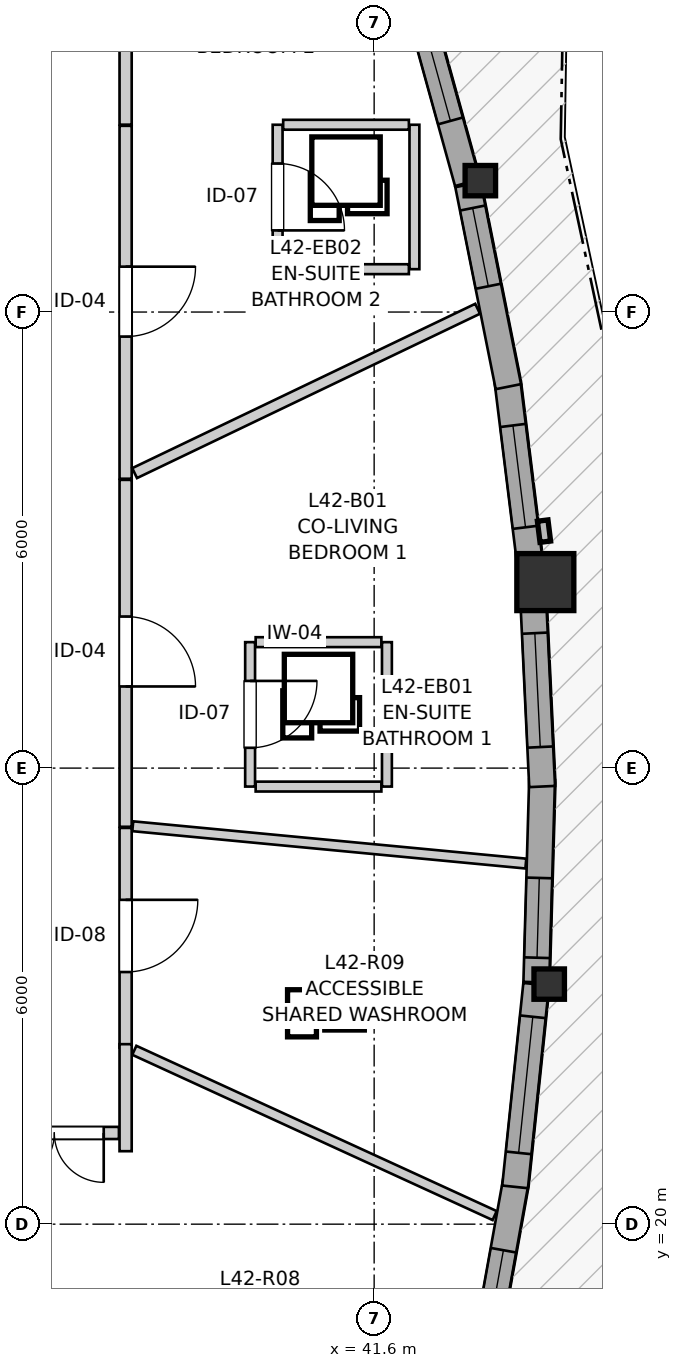
"""IFC4 building model, lengths in metres.
Left out: names, types, materials, properties, quantities, classifications, styles, units other than length and angle.
Written with IfcOpenShell. Run it as: python <this file> out.ifc"""

import sys

from ifc_helpers import new_model, si_unit, direction, frame, frame_2d, origin, origin_2d, place, context, subcontext, project, spatial, rectangle, i_section, extrude, source, transform, mapped, element, fill, save


model = new_model("IFC4")
c1 = context("Model", 3, precision=1e-05, world=origin(), true_north=direction((0.0, 1.0)))
c2 = subcontext(c1, "Body", "Model", "MODEL_VIEW")
j1 = project(units=[si_unit("LENGTHUNIT", "METRE"), si_unit("PLANEANGLEUNIT", "RADIAN")], contexts=[c1])
p1 = place(None, origin())
s1 = spatial("IfcSite", under=j1, at=p1, CompositionType="ELEMENT")
p2 = place(p1, origin())
s2 = spatial("IfcBuilding", under=s1, at=p2, CompositionType="ELEMENT")
p3 = place(p2, frame((0.0, 0.0, 142.6)))
s3 = spatial("IfcBuildingStorey", under=s2, at=p3, CompositionType="ELEMENT", Elevation=142.6)
m1 = source(origin(), c2, "Body", "SweptSolid", [
    extrude(i_section(OverallWidth=0.401, OverallDepth=0.399, WebThickness=0.023, FlangeThickness=0.036, FilletRadius=0.015, at=origin_2d()), origin(), (0.0, 0.0, 1.0), 2.95),
])
p4 = place(p3, frame((43.903, 23.158, 0.0), z_axis=(0.0, 0.0, 1.0), x_axis=(1.0, 0.0, 0.0)))
e1 = element("IfcColumn", 1, at=p4, inside=s3, PredefinedType="PILASTER", context=c2, shape_type="MappedRepresentation", body=[
    mapped(m1, transform((0.0, 0.0, 0.0), x_axis=(1.0, 0.0, 0.0), y_axis=(0.0, 1.0, 0.0), z_axis=(0.0, 0.0, 1.0), scale=1.0)),
])
m2 = source(origin(), c2, "Body", "SweptSolid", [
    extrude(rectangle(XDim=0.75, YDim=0.75, at=origin_2d()), origin(), (0.0, 0.0, 1.0), 2.95),
])
p5 = place(p3, frame((43.852, 28.447, 0.0), z_axis=(0.0, 0.0, 1.0), x_axis=(1.0, 0.0, 0.0)))
e2 = element("IfcColumn", 2, at=p5, inside=s3, PredefinedType="COLUMN", context=c2, shape_type="MappedRepresentation", body=[
    mapped(m2, transform((0.0, 0.0, 0.0), x_axis=(1.0, 0.0, 0.0), y_axis=(0.0, 1.0, 0.0), z_axis=(0.0, 0.0, 1.0), scale=1.0)),
])
p6 = place(p3, frame((42.997, 33.729, 0.0), z_axis=(0.0, 0.0, 1.0), x_axis=(1.0, 0.0, 0.0)))
e3 = element("IfcColumn", 3, at=p6, inside=s3, PredefinedType="PILASTER", context=c2, shape_type="MappedRepresentation", body=[
    mapped(m1, transform((0.0, 0.0, 0.0), x_axis=(1.0, 0.0, 0.0), y_axis=(0.0, 1.0, 0.0), z_axis=(0.0, 0.0, 1.0), scale=1.0)),
])
p7 = place(p3, frame((43.01, 18.044, 0.0), z_axis=(0.0, 0.0, 1.0), x_axis=(0.177116262048, 0.984189935794, 0.0)))
e4 = element("IfcWall", 4, at=p7, inside=s3, PredefinedType="SOLIDWALL", context=c2, shape_type="SweptSolid", body=[
    extrude(rectangle(XDim=2.575, YDim=0.34, at=frame_2d((1.288, 0.0))), origin(), (0.0, 0.0, 1.0), 2.53),
])
p8 = place(p7, frame((0.489, 0.0, 0.82)))
e5 = element("IfcOpeningElement", 5, at=p8, cuts=e4, PredefinedType="OPENING", context=c2, shape_type="SweptSolid", body=[
    extrude(rectangle(XDim=1.15, YDim=1.2, at=frame_2d((0.575, 0.6))), frame((0.0, 0.18, 0.0), z_axis=(0.0, -1.0, 0.0), x_axis=(1.0, 0.0, 0.0)), (0.0, 0.0, 1.0), 0.36),
])
p9 = place(p3, frame((43.454, 20.49, 0.0), z_axis=(0.0, 0.0, 1.0), x_axis=(0.103669919384, 0.994611757328, 0.0)))
e6 = element("IfcWall", 6, at=p9, inside=s3, PredefinedType="SOLIDWALL", context=c2, shape_type="SweptSolid", body=[
    extrude(rectangle(XDim=2.68, YDim=0.34, at=frame_2d((1.34, 0.0))), origin(), (0.0, 0.0, 1.0), 2.53),
])
p10 = place(p9, frame((0.45, 0.0, 0.82)))
e7 = element("IfcOpeningElement", 7, at=p10, cuts=e6, PredefinedType="OPENING", context=c2, shape_type="SweptSolid", body=[
    extrude(rectangle(XDim=1.8, YDim=1.45, at=frame_2d((0.9, 0.725))), frame((0.0, 0.18, 0.0), z_axis=(0.0, -1.0, 0.0), x_axis=(1.0, 0.0, 0.0)), (0.0, 0.0, 1.0), 0.36),
])
p11 = place(p3, frame((43.734, 23.183, 0.0), z_axis=(0.0, 0.0, 1.0), x_axis=(0.028311286797, 0.999599155182, 0.0)))
e8 = element("IfcWall", 8, at=p11, inside=s3, PredefinedType="SOLIDWALL", context=c2, shape_type="SweptSolid", body=[
    extrude(rectangle(XDim=2.665, YDim=0.34, at=frame_2d((1.332, 0.0))), origin(), (0.0, 0.0, 1.0), 2.53),
])
p12 = place(p11, frame((0.323, 0.0, 0.82)))
e9 = element("IfcOpeningElement", 9, at=p12, cuts=e8, PredefinedType="OPENING", context=c2, shape_type="SweptSolid", body=[
    extrude(rectangle(XDim=1.05, YDim=1.45, at=frame_2d((0.525, 0.725))), frame((0.0, 0.18, 0.0), z_axis=(0.0, -1.0, 0.0), x_axis=(1.0, 0.0, 0.0)), (0.0, 0.0, 1.0), 0.36),
])
p13 = place(p3, frame((43.81, 25.758, 0.0), z_axis=(0.0, 0.0, 1.0), x_axis=(-0.047679791281, 0.998862671994, 0.0)))
e10 = element("IfcWall", 10, at=p13, inside=s3, PredefinedType="SOLIDWALL", context=c2, shape_type="SweptSolid", body=[
    extrude(rectangle(XDim=2.53, YDim=0.34, at=frame_2d((1.265, 0.0))), origin(), (0.0, 0.0, 1.0), 2.53),
])
p14 = place(p13, frame((0.52, 0.0, 0.82)))
e11 = element("IfcOpeningElement", 11, at=p14, cuts=e10, PredefinedType="OPENING", context=c2, shape_type="SweptSolid", body=[
    extrude(rectangle(XDim=1.5, YDim=1.45, at=frame_2d((0.75, 0.725))), frame((0.0, 0.18, 0.0), z_axis=(0.0, -1.0, 0.0), x_axis=(1.0, 0.0, 0.0)), (0.0, 0.0, 1.0), 0.36),
])
p15 = place(p3, frame((43.664, 28.58, 0.0), z_axis=(0.0, 0.0, 1.0), x_axis=(-0.122794881762, 0.992432071737, 0.0)))
e12 = element("IfcWall", 12, at=p15, inside=s3, PredefinedType="SOLIDWALL", context=c2, shape_type="SweptSolid", body=[
    extrude(rectangle(XDim=2.545, YDim=0.34, at=frame_2d((1.272, 0.0))), origin(), (0.0, 0.0, 1.0), 2.53),
])
p16 = place(p15, frame((0.592, 0.0, 0.82)))
e13 = element("IfcOpeningElement", 13, at=p16, cuts=e12, PredefinedType="OPENING", context=c2, shape_type="SweptSolid", body=[
    extrude(rectangle(XDim=1.35, YDim=1.45, at=frame_2d((0.675, 0.725))), frame((0.0, 0.18, 0.0), z_axis=(0.0, -1.0, 0.0), x_axis=(1.0, 0.0, 0.0)), (0.0, 0.0, 1.0), 0.36),
])
p17 = place(p3, frame((43.366, 31.018, 0.0), z_axis=(0.0, 0.0, 1.0), x_axis=(-0.196116135138, 0.980580675691, 0.0)))
e14 = element("IfcWall", 14, at=p17, inside=s3, PredefinedType="SOLIDWALL", context=c2, shape_type="SweptSolid", body=[
    extrude(rectangle(XDim=2.71, YDim=0.34, at=frame_2d((1.355, 0.0))), origin(), (0.0, 0.0, 1.0), 2.53),
])
p18 = place(p17, frame((1.347, 0.0, 0.82)))
e15 = element("IfcOpeningElement", 15, at=p18, cuts=e14, PredefinedType="OPENING", context=c2, shape_type="SweptSolid", body=[
    extrude(rectangle(XDim=1.05, YDim=1.45, at=frame_2d((0.525, 0.725))), frame((0.0, 0.18, 0.0), z_axis=(0.0, -1.0, 0.0), x_axis=(1.0, 0.0, 0.0)), (0.0, 0.0, 1.0), 0.36),
])
p19 = place(p3, frame((42.828, 33.703, 0.0), z_axis=(0.0, 0.0, 1.0), x_axis=(-0.266340796898, 0.963878923884, 0.0)))
e16 = element("IfcWall", 16, at=p19, inside=s3, PredefinedType="SOLIDWALL", context=c2, shape_type="SweptSolid", body=[
    extrude(rectangle(XDim=2.755, YDim=0.34, at=frame_2d((1.377, 0.0))), origin(), (0.0, 0.0, 1.0), 2.53),
])
p20 = place(p19, frame((0.842, 0.0, 0.82)))
e17 = element("IfcOpeningElement", 17, at=p20, cuts=e16, PredefinedType="OPENING", context=c2, shape_type="SweptSolid", body=[
    extrude(rectangle(XDim=1.05, YDim=1.45, at=frame_2d((0.525, 0.725))), frame((0.0, 0.18, 0.0), z_axis=(0.0, -1.0, 0.0), x_axis=(1.0, 0.0, 0.0)), (0.0, 0.0, 1.0), 0.36),
])
p21 = place(p3, frame((38.33, 34.45, 0.0), z_axis=(0.0, 0.0, 1.0), x_axis=(0.0, -1.0, 0.0)))
e18 = element("IfcWall", 18, at=p21, inside=s3, PredefinedType="PARTITIONING", context=c2, shape_type="SweptSolid", body=[
    extrude(rectangle(XDim=4.643, YDim=0.16, at=frame_2d((2.322, 0.0))), origin(), (0.0, 0.0, 1.0), 2.588),
])
p22 = place(p21, frame((1.853, 0.0, 0.0)))
e19 = element("IfcOpeningElement", 19, at=p22, cuts=e18, PredefinedType="OPENING", context=c2, shape_type="SweptSolid", body=[
    extrude(rectangle(XDim=0.92, YDim=2.1, at=frame_2d((0.46, 1.05))), frame((0.0, 0.09, 0.0), z_axis=(0.0, -1.0, 0.0), x_axis=(1.0, 0.0, 0.0)), (0.0, 0.0, 1.0), 0.18),
])
p23 = place(p3, frame((38.33, 29.792, 0.0), z_axis=(0.0, 0.0, 1.0), x_axis=(0.0, -1.0, 0.0)))
e20 = element("IfcWall", 20, at=p23, inside=s3, PredefinedType="PARTITIONING", context=c2, shape_type="SweptSolid", body=[
    extrude(rectangle(XDim=4.564, YDim=0.16, at=frame_2d((2.282, 0.0))), origin(), (0.0, 0.0, 1.0), 2.95),
])
p24 = place(p23, frame((1.798, 0.0, 0.0)))
e21 = element("IfcOpeningElement", 21, at=p24, cuts=e20, PredefinedType="OPENING", context=c2, shape_type="SweptSolid", body=[
    extrude(rectangle(XDim=0.92, YDim=2.1, at=frame_2d((0.46, 1.05))), frame((0.0, 0.09, 0.0), z_axis=(0.0, -1.0, 0.0), x_axis=(1.0, 0.0, 0.0)), (0.0, 0.0, 1.0), 0.18),
])
p25 = place(p3, frame((38.33, 25.213, 0.0), z_axis=(0.0, 0.0, 1.0), x_axis=(0.0, -1.0, 0.0)))
e22 = element("IfcWall", 22, at=p25, inside=s3, PredefinedType="PARTITIONING", context=c2, shape_type="SweptSolid", body=[
    extrude(rectangle(XDim=2.89, YDim=0.16, at=frame_2d((1.445, 0.0))), origin(), (0.0, 0.0, 1.0), 2.95),
])
p26 = place(p25, frame((0.946, 0.0, 0.0)))
e23 = element("IfcOpeningElement", 23, at=p26, cuts=e22, PredefinedType="OPENING", context=c2, shape_type="SweptSolid", body=[
    extrude(rectangle(XDim=0.95, YDim=2.1, at=frame_2d((0.475, 1.05))), frame((0.0, 0.09, 0.0), z_axis=(0.0, -1.0, 0.0), x_axis=(1.0, 0.0, 0.0)), (0.0, 0.0, 1.0), 0.18),
])
p27 = place(p3, frame((39.968, 27.657, 0.0), z_axis=(0.0, 0.0, 1.0), x_axis=(0.0, -1.0, 0.0)))
e24 = element("IfcWall", 24, at=p27, inside=s3, PredefinedType="PARTITIONING", context=c2, shape_type="SweptSolid", body=[
    extrude(rectangle(XDim=1.9, YDim=0.13, at=frame_2d((0.95, 0.0))), origin(), (0.0, 0.0, 1.0), 2.95),
])
p28 = place(p27, frame((0.51, 0.0, 0.0)))
e25 = element("IfcOpeningElement", 25, at=p28, cuts=e24, PredefinedType="OPENING", context=c2, shape_type="SweptSolid", body=[
    extrude(rectangle(XDim=0.88, YDim=2.05, at=frame_2d((0.44, 1.025))), frame((0.0, 0.075, 0.0), z_axis=(0.0, -1.0, 0.0), x_axis=(1.0, 0.0, 0.0)), (0.0, 0.0, 1.0), 0.15),
])
p29 = place(p3, frame((40.33, 34.464, 0.0), z_axis=(0.0, 0.0, 1.0), x_axis=(0.0, -1.0, 0.0)))
e26 = element("IfcWall", 26, at=p29, inside=s3, PredefinedType="PARTITIONING", context=c2, shape_type="SweptSolid", body=[
    extrude(rectangle(XDim=1.9, YDim=0.13, at=frame_2d((0.95, 0.0))), origin(), (0.0, 0.0, 1.0), 2.558),
])
p30 = place(p29, frame((0.51, 0.0, 0.0)))
e27 = element("IfcOpeningElement", 27, at=p30, cuts=e26, PredefinedType="OPENING", context=c2, shape_type="SweptSolid", body=[
    extrude(rectangle(XDim=0.88, YDim=2.05, at=frame_2d((0.44, 1.025))), frame((0.0, 0.075, 0.0), z_axis=(0.0, -1.0, 0.0), x_axis=(1.0, 0.0, 0.0)), (0.0, 0.0, 1.0), 0.15),
])
p31 = place(p3, frame((38.242, 21.2, 0.0), z_axis=(0.0, 0.0, 1.0), x_axis=(-1.0, 0.0, 0.0)))
e28 = element("IfcWall", 28, at=p31, inside=s3, PredefinedType="PARTITIONING", context=c2, shape_type="SweptSolid", body=[
    extrude(rectangle(XDim=1.684, YDim=0.16, at=frame_2d((0.842, 0.0))), origin(), (0.0, 0.0, 1.0), 2.95),
])
p32 = place(p31, frame((0.2, 0.0, 0.0)))
e29 = element("IfcOpeningElement", 29, at=p32, cuts=e28, PredefinedType="OPENING", context=c2, shape_type="SweptSolid", body=[
    extrude(rectangle(XDim=1.3, YDim=2.1, at=frame_2d((0.65, 1.05))), frame((0.0, 0.09, 0.0), z_axis=(0.0, -1.0, 0.0), x_axis=(1.0, 0.0, 0.0)), (0.0, 0.0, 1.0), 0.18),
])
p33 = place(p3, frame((36.609, 19.221, 0.0), z_axis=(0.0, 0.0, 1.0), x_axis=(0.67832941292, -0.734757924467, 0.0)))
e30 = element("IfcWall", 30, at=p33, inside=s3, PredefinedType="PARTITIONING", context=c2, shape_type="SweptSolid", body=[
    extrude(rectangle(XDim=7.403, YDim=0.145, at=frame_2d((3.701, 0.0))), origin(), (0.0, 0.0, 1.0), 2.95),
])
p34 = place(p3, frame((38.444, 22.288, 0.0), z_axis=(0.0, 0.0, 1.0), x_axis=(0.908945866603, -0.416914153736, 0.0)))
e31 = element("IfcWall", 31, at=p34, inside=s3, PredefinedType="PARTITIONING", context=c2, shape_type="SweptSolid", body=[
    extrude(rectangle(XDim=5.217, YDim=0.13, at=frame_2d((2.608, 0.0))), origin(), (0.0, 0.0, 1.0), 2.95),
])
p35 = place(p3, frame((38.424, 25.235, 0.0), z_axis=(0.0, 0.0, 1.0), x_axis=(0.995523942217, -0.094509684549, 0.0)))
e32 = element("IfcWall", 32, at=p35, inside=s3, PredefinedType="PARTITIONING", context=c2, shape_type="SweptSolid", body=[
    extrude(rectangle(XDim=5.195, YDim=0.13, at=frame_2d((2.597, 0.0))), origin(), (0.0, 0.0, 1.0), 2.95),
])
p36 = place(p3, frame((38.448, 29.881, 0.0), z_axis=(0.0, 0.0, 1.0), x_axis=(0.901842564972, 0.432064796072, 0.0)))
e33 = element("IfcWall", 33, at=p36, inside=s3, PredefinedType="PARTITIONING", context=c2, shape_type="SweptSolid", body=[
    extrude(rectangle(XDim=5.004, YDim=0.145, at=frame_2d((2.502, 0.0))), origin(), (0.0, 0.0, 1.0), 2.95),
])
p37 = place(p3, frame((41.768, 25.757, 0.0), z_axis=(0.0, 0.0, 1.0), x_axis=(0.0, 1.0, 0.0)))
e34 = element("IfcWall", 34, at=p37, inside=s3, PredefinedType="PARTITIONING", context=c2, shape_type="SweptSolid", body=[
    extrude(rectangle(XDim=1.9, YDim=0.13, at=frame_2d((0.95, 0.0))), origin(), (0.0, 0.0, 1.0), 2.95),
])
p38 = place(p3, frame((42.13, 32.564, 0.0), z_axis=(0.0, 0.0, 1.0), x_axis=(0.0, 1.0, 0.0)))
e35 = element("IfcWall", 35, at=p38, inside=s3, PredefinedType="PARTITIONING", context=c2, shape_type="SweptSolid", body=[
    extrude(rectangle(XDim=1.9, YDim=0.13, at=frame_2d((0.95, 0.0))), origin(), (0.0, 0.0, 1.0), 2.95),
])
for number, where, z_axis, x_axis in (
    (36, (40.403, 34.464, 0.0), (0.0, 0.0, 1.0), (1.0, 0.0, 0.0)),
    (37, (40.403, 32.564, 0.0), (0.0, 0.0, 1.0), (1.0, 0.0, 0.0)),
):
    element("IfcWall", number, at=place(p3, frame(where, z_axis=z_axis, x_axis=x_axis)), inside=s3, PredefinedType="PARTITIONING", context=c2, shape_type="SweptSolid", body=[
        extrude(rectangle(XDim=1.654, YDim=0.13, at=frame_2d((0.827, 0.0))), origin(), (0.0, 0.0, 1.0), 2.95),
    ])
p39 = place(p3, frame((40.041, 27.657, 0.0), z_axis=(0.0, 0.0, 1.0), x_axis=(1.0, 0.0, 0.0)))
e38 = element("IfcWall", 38, at=p39, inside=s3, PredefinedType="PARTITIONING", context=c2, shape_type="SweptSolid", body=[
    extrude(rectangle(XDim=1.654, YDim=0.13, at=frame_2d((0.827, 0.0))), origin(), (0.0, 0.0, 1.0), 2.318),
])
p40 = place(p3, frame((40.041, 25.757, 0.0), z_axis=(0.0, 0.0, 1.0), x_axis=(1.0, 0.0, 0.0)))
e39 = element("IfcWall", 39, at=p40, inside=s3, PredefinedType="PARTITIONING", context=c2, shape_type="SweptSolid", body=[
    extrude(rectangle(XDim=1.654, YDim=0.13, at=frame_2d((0.827, 0.0))), origin(), (0.0, 0.0, 1.0), 2.95),
])
p41 = place(p3, frame((38.33, 34.465, 0.0), z_axis=(0.0, 0.0, 1.0), x_axis=(0.0, 1.0, 0.0)))
e40 = element("IfcWall", 40, at=p41, inside=s3, PredefinedType="PARTITIONING", context=c2, shape_type="SweptSolid", body=[
    extrude(rectangle(XDim=1.765, YDim=0.16, at=frame_2d((0.882, 0.0))), origin(), (0.0, 0.0, 1.0), 2.588),
])
p42 = place(p3, frame((38.33, 20.96, 0.0), z_axis=(0.0, 0.0, 1.0), x_axis=(0.0, 1.0, 0.0)))
e41 = element("IfcWall", 41, at=p42, inside=s3, PredefinedType="PARTITIONING", context=c2, shape_type="SweptSolid", body=[
    extrude(rectangle(XDim=1.408, YDim=0.16, at=frame_2d((0.704, 0.0))), origin(), (0.0, 0.0, 1.0), 2.95),
])
m3 = source(origin(), c2, "Body", "SweptSolid", [
    extrude(rectangle(XDim=1.15, YDim=1.2, at=frame_2d((0.575, 0.6))), frame((0.0, 0.03, 0.0), z_axis=(0.0, -1.0, 0.0), x_axis=(1.0, 0.0, 0.0)), (0.0, 0.0, 1.0), 0.06),
])
p43 = place(p8, origin())
e42 = element("IfcWindow", 42, at=p43, inside=s3, PartitioningType="SINGLE_PANEL", PredefinedType="WINDOW", context=c2, shape_type="MappedRepresentation", body=[
    mapped(m3, transform((0.0, 0.0, 0.0), x_axis=(1.0, 0.0, 0.0), y_axis=(0.0, 1.0, 0.0), z_axis=(0.0, 0.0, 1.0), scale=1.0)),
])
fill(e5, e42)
m4 = source(origin(), c2, "Body", "SweptSolid", [
    extrude(rectangle(XDim=1.8, YDim=1.45, at=frame_2d((0.9, 0.725))), frame((0.0, 0.03, 0.0), z_axis=(0.0, -1.0, 0.0), x_axis=(1.0, 0.0, 0.0)), (0.0, 0.0, 1.0), 0.06),
])
p44 = place(p10, origin())
e43 = element("IfcWindow", 43, at=p44, inside=s3, PartitioningType="SINGLE_PANEL", PredefinedType="WINDOW", context=c2, shape_type="MappedRepresentation", body=[
    mapped(m4, transform((0.0, 0.0, 0.0), x_axis=(1.0, 0.0, 0.0), y_axis=(0.0, 1.0, 0.0), z_axis=(0.0, 0.0, 1.0), scale=1.0)),
])
fill(e7, e43)
m5 = source(origin(), c2, "Body", "SweptSolid", [
    extrude(rectangle(XDim=1.05, YDim=1.45, at=frame_2d((0.525, 0.725))), frame((0.0, 0.03, 0.0), z_axis=(0.0, -1.0, 0.0), x_axis=(1.0, 0.0, 0.0)), (0.0, 0.0, 1.0), 0.06),
])
p45 = place(p12, origin())
e44 = element("IfcWindow", 44, at=p45, inside=s3, PartitioningType="SINGLE_PANEL", PredefinedType="WINDOW", context=c2, shape_type="MappedRepresentation", body=[
    mapped(m5, transform((0.0, 0.0, 0.0), x_axis=(1.0, 0.0, 0.0), y_axis=(0.0, 1.0, 0.0), z_axis=(0.0, 0.0, 1.0), scale=1.0)),
])
fill(e9, e44)
m6 = source(origin(), c2, "Body", "SweptSolid", [
    extrude(rectangle(XDim=1.5, YDim=1.45, at=frame_2d((0.75, 0.725))), frame((0.0, 0.03, 0.0), z_axis=(0.0, -1.0, 0.0), x_axis=(1.0, 0.0, 0.0)), (0.0, 0.0, 1.0), 0.06),
])
p46 = place(p14, origin())
e45 = element("IfcWindow", 45, at=p46, inside=s3, PartitioningType="SINGLE_PANEL", PredefinedType="WINDOW", context=c2, shape_type="MappedRepresentation", body=[
    mapped(m6, transform((0.0, 0.0, 0.0), x_axis=(1.0, 0.0, 0.0), y_axis=(0.0, 1.0, 0.0), z_axis=(0.0, 0.0, 1.0), scale=1.0)),
])
fill(e11, e45)
m7 = source(origin(), c2, "Body", "SweptSolid", [
    extrude(rectangle(XDim=1.35, YDim=1.45, at=frame_2d((0.675, 0.725))), frame((0.0, 0.03, 0.0), z_axis=(0.0, -1.0, 0.0), x_axis=(1.0, 0.0, 0.0)), (0.0, 0.0, 1.0), 0.06),
])
p47 = place(p16, origin())
e46 = element("IfcWindow", 46, at=p47, inside=s3, PartitioningType="SINGLE_PANEL", PredefinedType="WINDOW", context=c2, shape_type="MappedRepresentation", body=[
    mapped(m7, transform((0.0, 0.0, 0.0), x_axis=(1.0, 0.0, 0.0), y_axis=(0.0, 1.0, 0.0), z_axis=(0.0, 0.0, 1.0), scale=1.0)),
])
fill(e13, e46)
p48 = place(p18, origin())
e47 = element("IfcWindow", 47, at=p48, inside=s3, PartitioningType="SINGLE_PANEL", PredefinedType="WINDOW", context=c2, shape_type="MappedRepresentation", body=[
    mapped(m5, transform((0.0, 0.0, 0.0), x_axis=(1.0, 0.0, 0.0), y_axis=(0.0, 1.0, 0.0), z_axis=(0.0, 0.0, 1.0), scale=1.0)),
])
fill(e15, e47)
p49 = place(p20, origin())
e48 = element("IfcWindow", 48, at=p49, inside=s3, PartitioningType="SINGLE_PANEL", PredefinedType="WINDOW", context=c2, shape_type="MappedRepresentation", body=[
    mapped(m5, transform((0.0, 0.0, 0.0), x_axis=(1.0, 0.0, 0.0), y_axis=(0.0, 1.0, 0.0), z_axis=(0.0, 0.0, 1.0), scale=1.0)),
])
fill(e17, e48)
m8 = source(origin(), c2, "Body", "SweptSolid", [
    extrude(rectangle(XDim=0.92, YDim=2.1, at=frame_2d((0.46, 1.05))), frame((0.0, 0.025, 0.0), z_axis=(0.0, -1.0, 0.0), x_axis=(1.0, 0.0, 0.0)), (0.0, 0.0, 1.0), 0.05),
])
p50 = place(p22, origin())
e49 = element("IfcDoor", 49, at=p50, inside=s3, OperationType="SINGLE_SWING_LEFT", PredefinedType="DOOR", context=c2, shape_type="MappedRepresentation", body=[
    mapped(m8, transform((0.0, 0.0, 0.0), x_axis=(1.0, 0.0, 0.0), y_axis=(0.0, 1.0, 0.0), z_axis=(0.0, 0.0, 1.0), scale=1.0)),
])
fill(e19, e49)
p51 = place(p24, origin())
e50 = element("IfcDoor", 50, at=p51, inside=s3, OperationType="SINGLE_SWING_RIGHT", PredefinedType="DOOR", context=c2, shape_type="MappedRepresentation", body=[
    mapped(m8, transform((0.0, 0.0, 0.0), x_axis=(1.0, 0.0, 0.0), y_axis=(0.0, 1.0, 0.0), z_axis=(0.0, 0.0, 1.0), scale=1.0)),
])
fill(e21, e50)
m9 = source(origin(), c2, "Body", "SweptSolid", [
    extrude(rectangle(XDim=0.95, YDim=2.1, at=frame_2d((0.475, 1.05))), frame((0.0, 0.025, 0.0), z_axis=(0.0, -1.0, 0.0), x_axis=(1.0, 0.0, 0.0)), (0.0, 0.0, 1.0), 0.05),
])
p52 = place(p26, origin())
e51 = element("IfcDoor", 51, at=p52, inside=s3, OperationType="SINGLE_SWING_LEFT", PredefinedType="DOOR", context=c2, shape_type="MappedRepresentation", body=[
    mapped(m9, transform((0.0, 0.0, 0.0), x_axis=(1.0, 0.0, 0.0), y_axis=(0.0, 1.0, 0.0), z_axis=(0.0, 0.0, 1.0), scale=1.0)),
])
fill(e23, e51)
m10 = source(origin(), c2, "Body", "SweptSolid", [
    extrude(rectangle(XDim=0.88, YDim=2.05, at=frame_2d((0.44, 1.025))), frame((0.0, 0.025, 0.0), z_axis=(0.0, -1.0, 0.0), x_axis=(1.0, 0.0, 0.0)), (0.0, 0.0, 1.0), 0.05),
])
p53 = place(p28, origin())
e52 = element("IfcDoor", 52, at=p53, inside=s3, OperationType="SINGLE_SWING_LEFT", PredefinedType="DOOR", context=c2, shape_type="MappedRepresentation", body=[
    mapped(m10, transform((0.0, 0.0, 0.0), x_axis=(1.0, 0.0, 0.0), y_axis=(0.0, 1.0, 0.0), z_axis=(0.0, 0.0, 1.0), scale=1.0)),
])
fill(e25, e52)
p54 = place(p30, origin())
e53 = element("IfcDoor", 53, at=p54, inside=s3, OperationType="SINGLE_SWING_RIGHT", PredefinedType="DOOR", context=c2, shape_type="MappedRepresentation", body=[
    mapped(m10, transform((0.0, 0.0, 0.0), x_axis=(1.0, 0.0, 0.0), y_axis=(0.0, 1.0, 0.0), z_axis=(0.0, 0.0, 1.0), scale=1.0)),
])
fill(e27, e53)
m11 = source(origin(), c2, "Body", "SweptSolid", [
    extrude(rectangle(XDim=1.3, YDim=2.1, at=frame_2d((0.65, 1.05))), frame((0.0, 0.025, 0.0), z_axis=(0.0, -1.0, 0.0), x_axis=(1.0, 0.0, 0.0)), (0.0, 0.0, 1.0), 0.05),
])
p55 = place(p32, origin())
e54 = element("IfcDoor", 54, at=p55, inside=s3, OperationType="DOUBLE_DOOR_SINGLE_SWING", PredefinedType="DOOR", context=c2, shape_type="MappedRepresentation", body=[
    mapped(m11, transform((0.0, 0.0, 0.0), x_axis=(1.0, 0.0, 0.0), y_axis=(0.0, 1.0, 0.0), z_axis=(0.0, 0.0, 1.0), scale=1.0)),
])
fill(e29, e54)
save(model, sys.argv[1])
